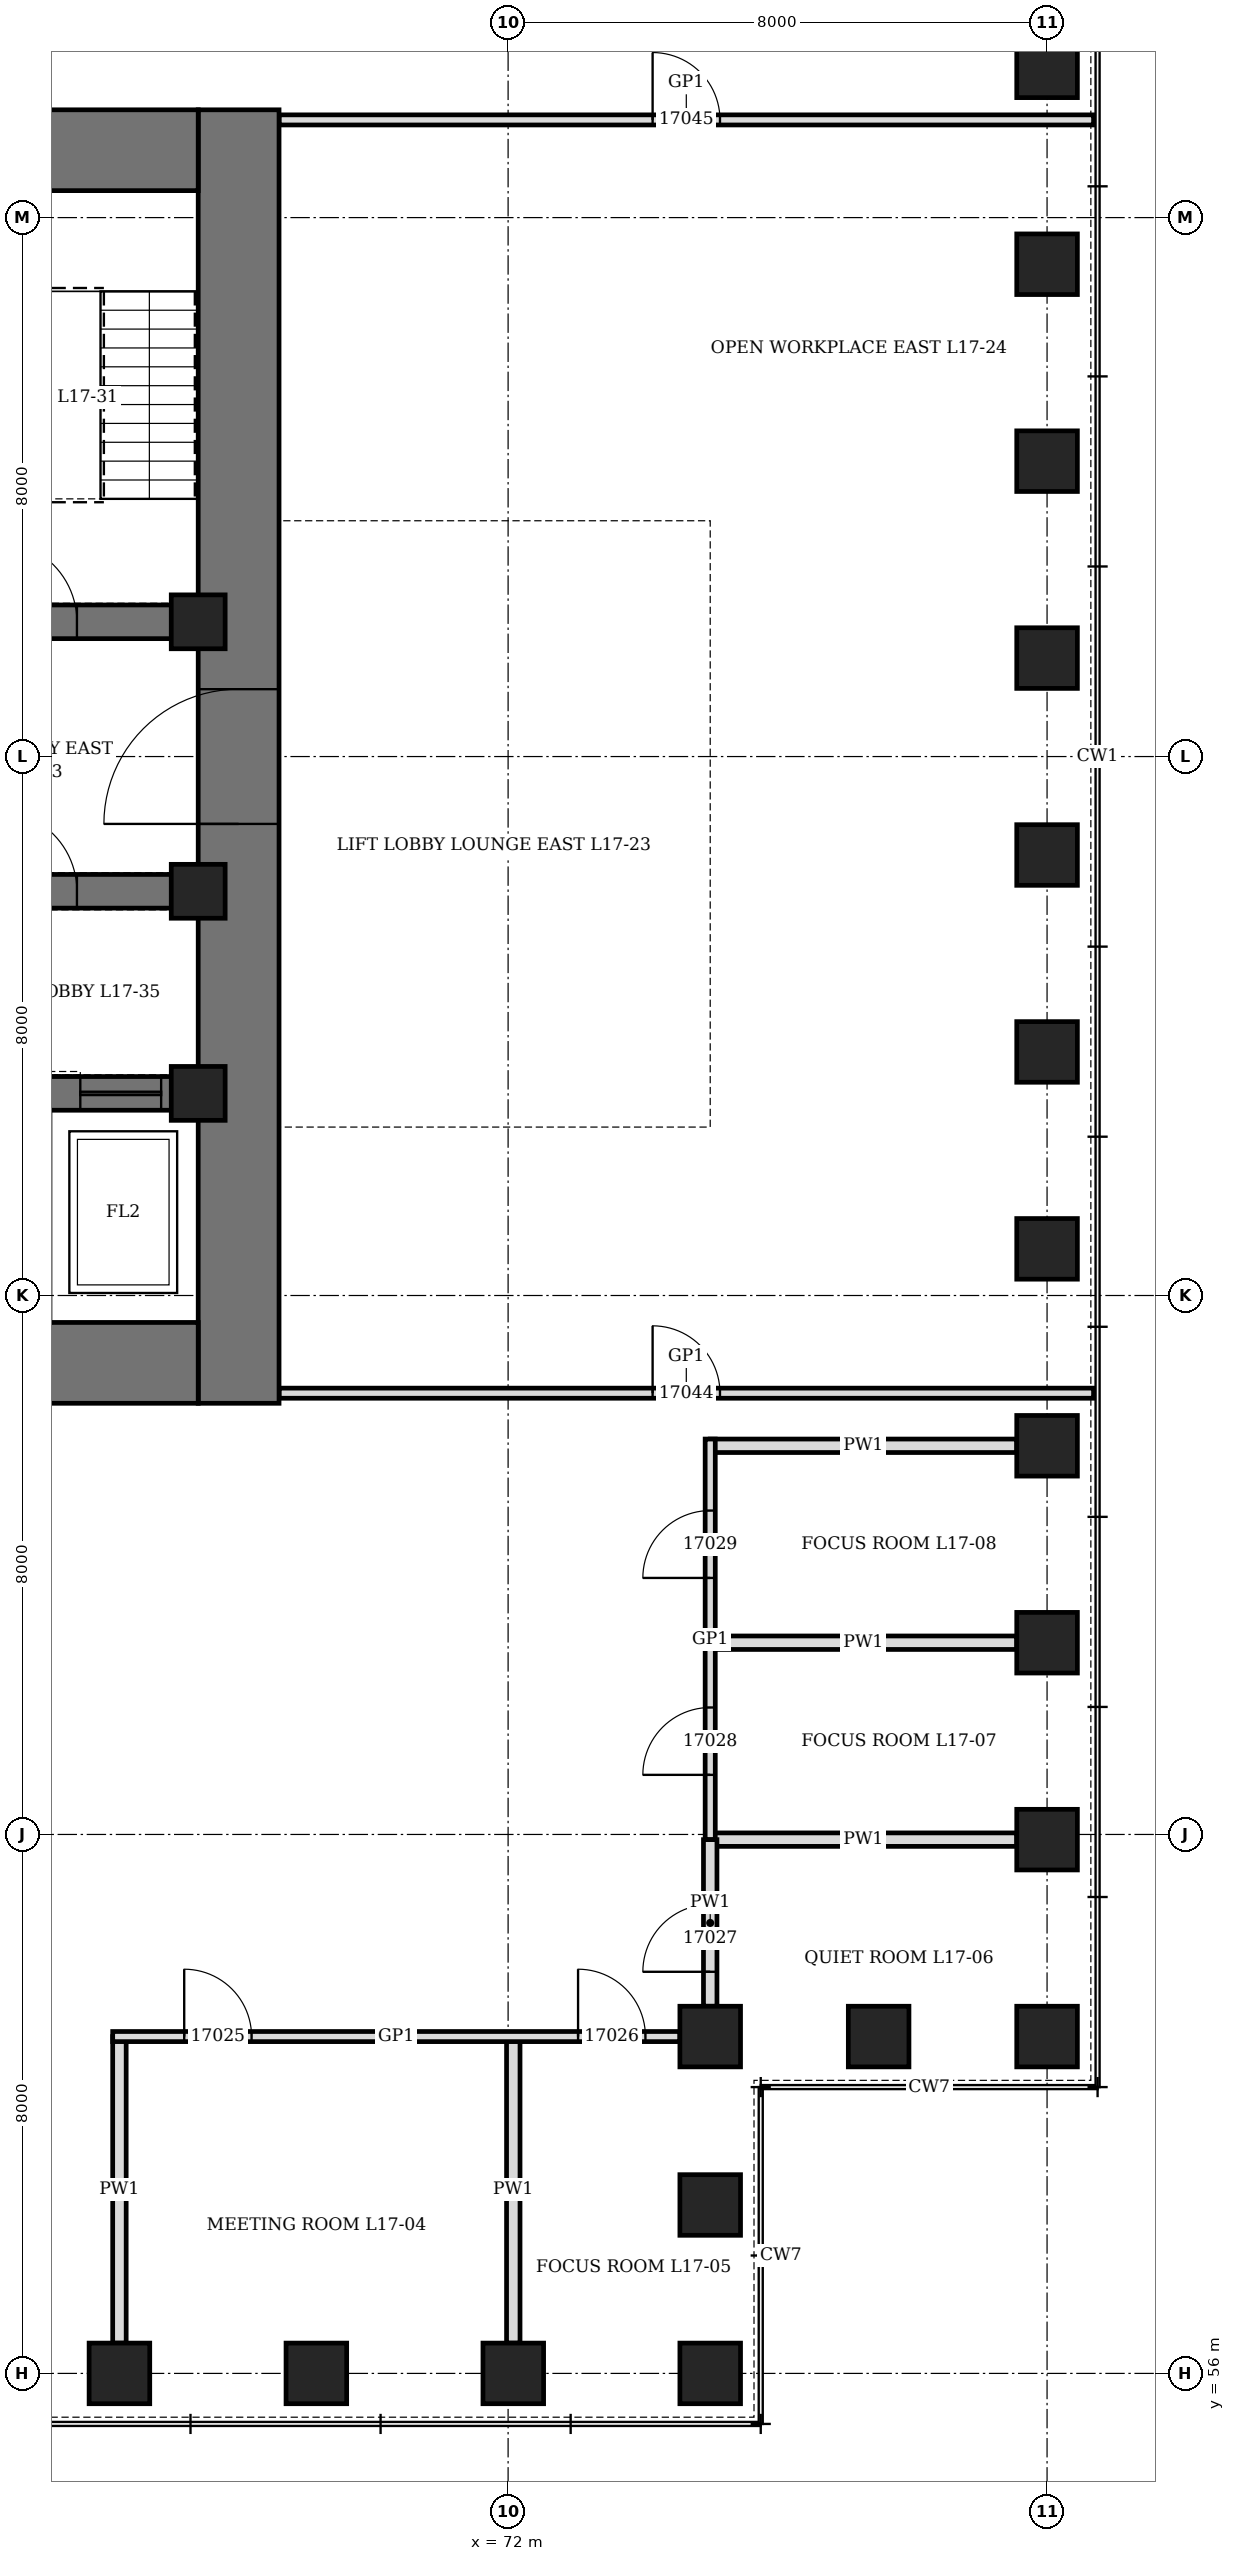
"""IFC4 building model, lengths in metres.
Left out: names, types, materials, properties, quantities, classifications, styles, units other than length and angle.
Written with IfcOpenShell. Run it as: python <this file> out.ifc"""

import sys

from ifc_helpers import new_model, si_unit, direction, frame, frame_2d, origin, origin_2d, place, context, subcontext, project, spatial, rectangle, hollow_rectangle, extrude, element, fill, save


model = new_model("IFC4")
c1 = context("Model", 3, precision=1e-05, world=origin(), true_north=direction((0.0, 1.0)))
c2 = subcontext(c1, "Body", "Model", "MODEL_VIEW")
j1 = project(units=[si_unit("LENGTHUNIT", "METRE"), si_unit("PLANEANGLEUNIT", "RADIAN")], contexts=[c1])
p1 = place(None, origin())
s1 = spatial("IfcSite", under=j1, at=p1, CompositionType="ELEMENT")
p2 = place(p1, origin())
s2 = spatial("IfcBuilding", under=s1, at=p2, CompositionType="ELEMENT")
p3 = place(p2, frame((0.0, 0.0, 81.1)))
s3 = spatial("IfcBuildingStorey", under=s2, at=p3, CompositionType="ELEMENT", Elevation=81.1)
for number, where, z_axis, x_axis in (
    (1, (66.231, 56.0, 0.0), (0.0, 0.0, 1.0), (1.0, 0.0, 0.0)),
    (2, (69.154, 56.0, 0.0), (0.0, 0.0, 1.0), (1.0, 0.0, 0.0)),
    (3, (72.077, 56.0, 0.0), (0.0, 0.0, 1.0), (1.0, 0.0, 0.0)),
    (4, (75.0, 56.0, 0.0), (0.0, 0.0, 1.0), (0.0, 1.0, 0.0)),
    (5, (75.0, 58.5, 0.0), (0.0, 0.0, 1.0), (0.0, 1.0, 0.0)),
    (6, (75.0, 61.0, 0.0), (0.0, 0.0, 1.0), (1.0, 0.0, 0.0)),
    (7, (77.5, 61.0, 0.0), (0.0, 0.0, 1.0), (1.0, 0.0, 0.0)),
    (8, (80.0, 61.0, 0.0), (0.0, 0.0, 1.0), (0.0, 1.0, 0.0)),
    (9, (80.0, 63.923, 0.0), (0.0, 0.0, 1.0), (0.0, 1.0, 0.0)),
    (10, (80.0, 66.846, 0.0), (0.0, 0.0, 1.0), (0.0, 1.0, 0.0)),
    (11, (80.0, 69.769, 0.0), (0.0, 0.0, 1.0), (0.0, 1.0, 0.0)),
    (12, (80.0, 72.692, 0.0), (0.0, 0.0, 1.0), (0.0, 1.0, 0.0)),
    (13, (80.0, 75.615, 0.0), (0.0, 0.0, 1.0), (0.0, 1.0, 0.0)),
    (14, (80.0, 78.539, 0.0), (0.0, 0.0, 1.0), (0.0, 1.0, 0.0)),
    (15, (80.0, 81.461, 0.0), (0.0, 0.0, 1.0), (0.0, 1.0, 0.0)),
    (16, (80.0, 84.385, 0.0), (0.0, 0.0, 1.0), (0.0, 1.0, 0.0)),
    (17, (80.0, 87.308, 0.0), (0.0, 0.0, 1.0), (0.0, 1.0, 0.0)),
    (18, (80.0, 90.231, 0.0), (0.0, 0.0, 1.0), (0.0, 1.0, 0.0)),
):
    element("IfcColumn", number, at=place(p3, frame(where, z_axis=z_axis, x_axis=x_axis)), inside=s3, PredefinedType="COLUMN", context=c2, shape_type="SweptSolid", body=[
        extrude(hollow_rectangle(XDim=0.9, YDim=0.9, WallThickness=0.12, at=origin_2d()), origin(), (0.0, 0.0, 1.0), 4.2),
    ])
p4 = place(p3, frame((68.0, 70.4, 0.0), z_axis=(0.0, 0.0, 1.0), x_axis=(0.0, 1.0, 0.0)))
e19 = element("IfcWall", 19, at=p4, inside=s3, PredefinedType="SHEAR", context=c2, shape_type="SweptSolid", body=[
    extrude(rectangle(XDim=19.2, YDim=1.2, at=frame_2d((9.6, 0.0))), origin(), (0.0, 0.0, 1.0), 4.2),
])
p5 = place(p4, frame((8.6, 0.0, 0.0)))
e20 = element("IfcOpeningElement", 20, at=p5, cuts=e19, PredefinedType="OPENING", context=c2, shape_type="SweptSolid", body=[
    extrude(rectangle(XDim=2.0, YDim=2.4, at=frame_2d((1.0, 1.2))), frame((0.0, 0.61, 0.0), z_axis=(0.0, -1.0, 0.0), x_axis=(1.0, 0.0, 0.0)), (0.0, 0.0, 1.0), 1.22),
])
p6 = place(p3, frame((44.6, 71.0, 0.0), z_axis=(0.0, 0.0, 1.0), x_axis=(1.0, 0.0, 0.0)))
e21 = element("IfcWall", 21, at=p6, inside=s3, PredefinedType="SHEAR", context=c2, shape_type="SweptSolid", body=[
    extrude(rectangle(XDim=22.8, YDim=1.2, at=frame_2d((11.4, 0.0))), origin(), (0.0, 0.0, 1.0), 4.2),
])
p7 = place(p3, frame((44.6, 89.0, 0.0), z_axis=(0.0, 0.0, 1.0), x_axis=(1.0, 0.0, 0.0)))
e22 = element("IfcWall", 22, at=p7, inside=s3, PredefinedType="SHEAR", context=c2, shape_type="SweptSolid", body=[
    extrude(rectangle(XDim=22.8, YDim=1.2, at=frame_2d((11.4, 0.0))), origin(), (0.0, 0.0, 1.0), 4.2),
])
p8 = place(p7, frame((6.55, 0.0, 0.0)))
e23 = element("IfcOpeningElement", 23, at=p8, cuts=e22, PredefinedType="OPENING", context=c2, shape_type="SweptSolid", body=[
    extrude(rectangle(XDim=1.0, YDim=2.1, at=frame_2d((0.5, 1.05))), frame((0.0, 0.61, 0.0), z_axis=(0.0, -1.0, 0.0), x_axis=(1.0, 0.0, 0.0)), (0.0, 0.0, 1.0), 1.22),
])
p9 = place(p7, frame((9.45, 0.0, 0.0)))
e24 = element("IfcOpeningElement", 24, at=p9, cuts=e22, PredefinedType="OPENING", context=c2, shape_type="SweptSolid", body=[
    extrude(rectangle(XDim=0.9, YDim=2.1, at=frame_2d((0.45, 1.05))), frame((0.0, 0.61, 0.0), z_axis=(0.0, -1.0, 0.0), x_axis=(1.0, 0.0, 0.0)), (0.0, 0.0, 1.0), 1.22),
])
p10 = place(p7, frame((12.05, 0.0, 0.0)))
e25 = element("IfcOpeningElement", 25, at=p10, cuts=e22, PredefinedType="OPENING", context=c2, shape_type="SweptSolid", body=[
    extrude(rectangle(XDim=0.9, YDim=2.1, at=frame_2d((0.45, 1.05))), frame((0.0, 0.61, 0.0), z_axis=(0.0, -1.0, 0.0), x_axis=(1.0, 0.0, 0.0)), (0.0, 0.0, 1.0), 1.22),
])
p11 = place(p7, frame((13.975, 0.0, 0.0)))
e26 = element("IfcOpeningElement", 26, at=p11, cuts=e22, PredefinedType="OPENING", context=c2, shape_type="SweptSolid", body=[
    extrude(rectangle(XDim=0.9, YDim=2.1, at=frame_2d((0.45, 1.05))), frame((0.0, 0.61, 0.0), z_axis=(0.0, -1.0, 0.0), x_axis=(1.0, 0.0, 0.0)), (0.0, 0.0, 1.0), 1.22),
])
p12 = place(p3, frame((62.25, 75.0, 0.0), z_axis=(0.0, 0.0, 1.0), x_axis=(1.0, 0.0, 0.0)))
e27 = element("IfcWall", 27, at=p12, inside=s3, PredefinedType="SHEAR", context=c2, shape_type="SweptSolid", body=[
    extrude(rectangle(XDim=5.15, YDim=0.5, at=frame_2d((2.575, 0.0))), origin(), (0.0, 0.0, 1.0), 4.2),
])
p13 = place(p12, frame((0.65, 0.0, 0.0)))
e28 = element("IfcOpeningElement", 28, at=p13, cuts=e27, PredefinedType="OPENING", context=c2, shape_type="SweptSolid", body=[
    extrude(rectangle(XDim=1.2, YDim=2.2, at=frame_2d((0.6, 1.1))), frame((0.0, 0.26, 0.0), z_axis=(0.0, -1.0, 0.0), x_axis=(1.0, 0.0, 0.0)), (0.0, 0.0, 1.0), 0.52),
])
p14 = place(p12, frame((3.4, 0.0, 0.0)))
e29 = element("IfcOpeningElement", 29, at=p14, cuts=e27, PredefinedType="OPENING", context=c2, shape_type="SweptSolid", body=[
    extrude(rectangle(XDim=1.2, YDim=2.2, at=frame_2d((0.6, 1.1))), frame((0.0, 0.26, 0.0), z_axis=(0.0, -1.0, 0.0), x_axis=(1.0, 0.0, 0.0)), (0.0, 0.0, 1.0), 0.52),
])
p15 = place(p3, frame((62.25, 78.0, 0.0), z_axis=(0.0, 0.0, 1.0), x_axis=(1.0, 0.0, 0.0)))
e30 = element("IfcWall", 30, at=p15, inside=s3, PredefinedType="SHEAR", context=c2, shape_type="SweptSolid", body=[
    extrude(rectangle(XDim=5.15, YDim=0.5, at=frame_2d((2.575, 0.0))), origin(), (0.0, 0.0, 1.0), 4.2),
])
p16 = place(p15, frame((2.15, 0.0, 0.0)))
e31 = element("IfcOpeningElement", 31, at=p16, cuts=e30, PredefinedType="OPENING", context=c2, shape_type="SweptSolid", body=[
    extrude(rectangle(XDim=1.2, YDim=2.1, at=frame_2d((0.6, 1.05))), frame((0.0, 0.26, 0.0), z_axis=(0.0, -1.0, 0.0), x_axis=(1.0, 0.0, 0.0)), (0.0, 0.0, 1.0), 0.52),
])
p17 = place(p3, frame((62.25, 82.0, 0.0), z_axis=(0.0, 0.0, 1.0), x_axis=(1.0, 0.0, 0.0)))
e32 = element("IfcWall", 32, at=p17, inside=s3, PredefinedType="SHEAR", context=c2, shape_type="SweptSolid", body=[
    extrude(rectangle(XDim=5.15, YDim=0.5, at=frame_2d((2.575, 0.0))), origin(), (0.0, 0.0, 1.0), 4.2),
])
p18 = place(p17, frame((2.15, 0.0, 0.0)))
e33 = element("IfcOpeningElement", 33, at=p18, cuts=e32, PredefinedType="OPENING", context=c2, shape_type="SweptSolid", body=[
    extrude(rectangle(XDim=1.2, YDim=2.1, at=frame_2d((0.6, 1.05))), frame((0.0, 0.26, 0.0), z_axis=(0.0, -1.0, 0.0), x_axis=(1.0, 0.0, 0.0)), (0.0, 0.0, 1.0), 0.52),
])
for number, where, z_axis, x_axis in (
    (34, (67.4, 75.0, 0.0), (0.0, 0.0, 1.0), (1.0, 0.0, 0.0)),
    (35, (67.4, 78.0, 0.0), (0.0, 0.0, 1.0), (1.0, 0.0, 0.0)),
    (36, (67.4, 82.0, 0.0), (0.0, 0.0, 1.0), (1.0, 0.0, 0.0)),
):
    element("IfcColumn", number, at=place(p3, frame(where, z_axis=z_axis, x_axis=x_axis)), inside=s3, PredefinedType="COLUMN", context=c2, shape_type="SweptSolid", body=[
        extrude(hollow_rectangle(XDim=0.8, YDim=0.8, WallThickness=0.1, at=origin_2d()), origin(), (0.0, 0.0, 1.0), 4.2),
    ])
p19 = place(p3, frame((66.231, 56.45, 0.0), z_axis=(0.0, 0.0, 1.0), x_axis=(0.0, 1.0, 0.0)))
e37 = element("IfcWall", 37, at=p19, inside=s3, PredefinedType="PARTITIONING", context=c2, shape_type="SweptSolid", body=[
    extrude(rectangle(XDim=4.55, YDim=0.2, at=frame_2d((2.275, 0.0))), origin(), (0.0, 0.0, 1.0), 3.278),
])
for number, where, z_axis, x_axis in (
    (38, (72.077, 56.45, 0.0), (0.0, 0.0, 1.0), (0.0, 1.0, 0.0)),
    (39, (75.0, 63.923, 0.0), (0.0, 0.0, 1.0), (1.0, 0.0, 0.0)),
    (40, (75.0, 66.846, 0.0), (0.0, 0.0, 1.0), (1.0, 0.0, 0.0)),
    (41, (75.0, 69.769, 0.0), (0.0, 0.0, 1.0), (1.0, 0.0, 0.0)),
):
    element("IfcWall", number, at=place(p3, frame(where, z_axis=z_axis, x_axis=x_axis)), inside=s3, PredefinedType="PARTITIONING", context=c2, shape_type="SweptSolid", body=[
        extrude(rectangle(XDim=4.55, YDim=0.2, at=frame_2d((2.275, 0.0))), origin(), (0.0, 0.0, 1.0), 3.428),
    ])
p20 = place(p3, frame((66.131, 61.0, 0.0), z_axis=(0.0, 0.0, 1.0), x_axis=(1.0, 0.0, 0.0)))
e42 = element("IfcWall", 42, at=p20, inside=s3, PredefinedType="PARTITIONING", context=c2, shape_type="SweptSolid", body=[
    extrude(rectangle(XDim=8.419, YDim=0.15, at=frame_2d((4.209, 0.0))), origin(), (0.0, 0.0, 1.0), 4.04),
])
p21 = place(p20, frame((1.062, 0.0, 0.0)))
e43 = element("IfcOpeningElement", 43, at=p21, cuts=e42, PredefinedType="OPENING", context=c2, shape_type="SweptSolid", body=[
    extrude(rectangle(XDim=1.0, YDim=2.4, at=frame_2d((0.5, 1.2))), frame((0.0, 0.085, 0.0), z_axis=(0.0, -1.0, 0.0), x_axis=(1.0, 0.0, 0.0)), (0.0, 0.0, 1.0), 0.17),
])
p22 = place(p20, frame((6.908, 0.0, 0.0)))
e44 = element("IfcOpeningElement", 44, at=p22, cuts=e42, PredefinedType="OPENING", context=c2, shape_type="SweptSolid", body=[
    extrude(rectangle(XDim=1.0, YDim=2.4, at=frame_2d((0.5, 1.2))), frame((0.0, 0.085, 0.0), z_axis=(0.0, -1.0, 0.0), x_axis=(1.0, 0.0, 0.0)), (0.0, 0.0, 1.0), 0.17),
])
p23 = place(p3, frame((68.6, 70.55, 0.0), z_axis=(0.0, 0.0, 1.0), x_axis=(1.0, 0.0, 0.0)))
e45 = element("IfcWall", 45, at=p23, inside=s3, PredefinedType="PARTITIONING", context=c2, shape_type="SweptSolid", body=[
    extrude(rectangle(XDim=12.09, YDim=0.15, at=frame_2d((6.045, 0.0))), origin(), (0.0, 0.0, 1.0), 4.04),
])
p24 = place(p23, frame((5.545, 0.0, 0.0)))
e46 = element("IfcOpeningElement", 46, at=p24, cuts=e45, PredefinedType="OPENING", context=c2, shape_type="SweptSolid", body=[
    extrude(rectangle(XDim=1.0, YDim=2.4, at=frame_2d((0.5, 1.2))), frame((0.0, 0.085, 0.0), z_axis=(0.0, -1.0, 0.0), x_axis=(1.0, 0.0, 0.0)), (0.0, 0.0, 1.0), 0.17),
])
p25 = place(p3, frame((68.6, 89.45, 0.0), z_axis=(0.0, 0.0, 1.0), x_axis=(1.0, 0.0, 0.0)))
e47 = element("IfcWall", 47, at=p25, inside=s3, PredefinedType="PARTITIONING", context=c2, shape_type="SweptSolid", body=[
    extrude(rectangle(XDim=12.09, YDim=0.15, at=frame_2d((6.045, 0.0))), origin(), (0.0, 0.0, 1.0), 4.04),
])
p26 = place(p25, frame((5.545, 0.0, 0.0)))
e48 = element("IfcOpeningElement", 48, at=p26, cuts=e47, PredefinedType="OPENING", context=c2, shape_type="SweptSolid", body=[
    extrude(rectangle(XDim=1.0, YDim=2.4, at=frame_2d((0.5, 1.2))), frame((0.0, 0.085, 0.0), z_axis=(0.0, -1.0, 0.0), x_axis=(1.0, 0.0, 0.0)), (0.0, 0.0, 1.0), 0.17),
])
p27 = place(p3, frame((75.0, 63.923, 0.0), z_axis=(0.0, 0.0, 1.0), x_axis=(0.0, 1.0, 0.0)))
e49 = element("IfcWall", 49, at=p27, inside=s3, PredefinedType="PARTITIONING", context=c2, shape_type="SweptSolid", body=[
    extrude(rectangle(XDim=5.946, YDim=0.15, at=frame_2d((2.973, 0.0))), origin(), (0.0, 0.0, 1.0), 4.04),
])
p28 = place(p27, frame((0.961, 0.0, 0.0)))
e50 = element("IfcOpeningElement", 50, at=p28, cuts=e49, PredefinedType="OPENING", context=c2, shape_type="SweptSolid", body=[
    extrude(rectangle(XDim=1.0, YDim=2.4, at=frame_2d((0.5, 1.2))), frame((0.0, 0.085, 0.0), z_axis=(0.0, -1.0, 0.0), x_axis=(1.0, 0.0, 0.0)), (0.0, 0.0, 1.0), 0.17),
])
p29 = place(p27, frame((3.885, 0.0, 0.0)))
e51 = element("IfcOpeningElement", 51, at=p29, cuts=e49, PredefinedType="OPENING", context=c2, shape_type="SweptSolid", body=[
    extrude(rectangle(XDim=1.0, YDim=2.4, at=frame_2d((0.5, 1.2))), frame((0.0, 0.085, 0.0), z_axis=(0.0, -1.0, 0.0), x_axis=(1.0, 0.0, 0.0)), (0.0, 0.0, 1.0), 0.17),
])
p30 = place(p3, frame((75.0, 61.45, 0.0), z_axis=(0.0, 0.0, 1.0), x_axis=(0.0, 1.0, 0.0)))
e52 = element("IfcWall", 52, at=p30, inside=s3, PredefinedType="PARTITIONING", context=c2, shape_type="SweptSolid", body=[
    extrude(rectangle(XDim=2.473, YDim=0.2, at=frame_2d((1.237, 0.0))), origin(), (0.0, 0.0, 1.0), 4.04),
])
p31 = place(p30, frame((0.511, 0.0, 0.0)))
e53 = element("IfcOpeningElement", 53, at=p31, cuts=e52, PredefinedType="OPENING", context=c2, shape_type="SweptSolid", body=[
    extrude(rectangle(XDim=1.0, YDim=2.1, at=frame_2d((0.5, 1.05))), frame((0.0, 0.11, 0.0), z_axis=(0.0, -1.0, 0.0), x_axis=(1.0, 0.0, 0.0)), (0.0, 0.0, 1.0), 0.22),
])
p32 = place(p18, origin())
e54 = element("IfcDoor", 54, at=p32, inside=s3, OperationType="SINGLE_SWING_LEFT", PredefinedType="DOOR", context=c2, shape_type="SweptSolid", body=[
    extrude(rectangle(XDim=1.2, YDim=2.1, at=frame_2d((0.6, 1.05))), frame((0.0, 0.25, 0.0), z_axis=(0.0, -1.0, 0.0), x_axis=(1.0, 0.0, 0.0)), (0.0, 0.0, 1.0), 0.5),
])
fill(e33, e54)
p33 = place(p5, origin())
e55 = element("IfcDoor", 55, at=p33, inside=s3, OperationType="DOUBLE_DOOR_SINGLE_SWING", PredefinedType="DOOR", context=c2, shape_type="SweptSolid", body=[
    extrude(rectangle(XDim=2.0, YDim=2.4, at=frame_2d((1.0, 1.2))), frame((0.0, 0.35, 0.0), z_axis=(0.0, -1.0, 0.0), x_axis=(1.0, 0.0, 0.0)), (0.0, 0.0, 1.0), 0.7),
])
fill(e20, e55)
p34 = place(p16, origin())
e56 = element("IfcDoor", 56, at=p34, inside=s3, OperationType="SINGLE_SWING_RIGHT", PredefinedType="DOOR", context=c2, shape_type="SweptSolid", body=[
    extrude(rectangle(XDim=1.2, YDim=2.1, at=frame_2d((0.6, 1.05))), frame((0.0, 0.25, 0.0), z_axis=(0.0, -1.0, 0.0), x_axis=(1.0, 0.0, 0.0)), (0.0, 0.0, 1.0), 0.5),
])
fill(e31, e56)
p35 = place(p14, origin())
e57 = element("IfcDoor", 57, at=p35, inside=s3, OperationType="SLIDING_TO_LEFT", PredefinedType="DOOR", context=c2, shape_type="SweptSolid", body=[
    extrude(rectangle(XDim=1.2, YDim=2.2, at=frame_2d((0.6, 1.1))), frame((0.0, 0.25, 0.0), z_axis=(0.0, -1.0, 0.0), x_axis=(1.0, 0.0, 0.0)), (0.0, 0.0, 1.0), 0.5),
])
fill(e29, e57)
p36 = place(p21, origin())
e58 = element("IfcDoor", 58, at=p36, inside=s3, OperationType="SINGLE_SWING_RIGHT", PredefinedType="DOOR", context=c2, shape_type="SweptSolid", body=[
    extrude(rectangle(XDim=1.0, YDim=2.4, at=frame_2d((0.5, 1.2))), frame((0.0, 0.075, 0.0), z_axis=(0.0, -1.0, 0.0), x_axis=(1.0, 0.0, 0.0)), (0.0, 0.0, 1.0), 0.149),
])
fill(e43, e58)
p37 = place(p22, origin())
e59 = element("IfcDoor", 59, at=p37, inside=s3, OperationType="SINGLE_SWING_RIGHT", PredefinedType="DOOR", context=c2, shape_type="SweptSolid", body=[
    extrude(rectangle(XDim=1.0, YDim=2.4, at=frame_2d((0.5, 1.2))), frame((0.0, 0.075, 0.0), z_axis=(0.0, -1.0, 0.0), x_axis=(1.0, 0.0, 0.0)), (0.0, 0.0, 1.0), 0.149),
])
fill(e44, e59)
p38 = place(p31, origin())
e60 = element("IfcDoor", 60, at=p38, inside=s3, OperationType="SINGLE_SWING_LEFT", PredefinedType="DOOR", context=c2, shape_type="SweptSolid", body=[
    extrude(rectangle(XDim=1.0, YDim=2.1, at=frame_2d((0.5, 1.05))), frame((0.0, 0.1, 0.0), z_axis=(0.0, -1.0, 0.0), x_axis=(1.0, 0.0, 0.0)), (0.0, 0.0, 1.0), 0.199),
])
fill(e53, e60)
p39 = place(p28, origin())
e61 = element("IfcDoor", 61, at=p39, inside=s3, OperationType="SINGLE_SWING_RIGHT", PredefinedType="DOOR", context=c2, shape_type="SweptSolid", body=[
    extrude(rectangle(XDim=1.0, YDim=2.4, at=frame_2d((0.5, 1.2))), frame((0.0, 0.075, 0.0), z_axis=(0.0, -1.0, 0.0), x_axis=(1.0, 0.0, 0.0)), (0.0, 0.0, 1.0), 0.149),
])
fill(e50, e61)
p40 = place(p29, origin())
e62 = element("IfcDoor", 62, at=p40, inside=s3, OperationType="SINGLE_SWING_RIGHT", PredefinedType="DOOR", context=c2, shape_type="SweptSolid", body=[
    extrude(rectangle(XDim=1.0, YDim=2.4, at=frame_2d((0.5, 1.2))), frame((0.0, 0.075, 0.0), z_axis=(0.0, -1.0, 0.0), x_axis=(1.0, 0.0, 0.0)), (0.0, 0.0, 1.0), 0.149),
])
fill(e51, e62)
p41 = place(p24, origin())
e63 = element("IfcDoor", 63, at=p41, inside=s3, OperationType="SINGLE_SWING_RIGHT", PredefinedType="DOOR", context=c2, shape_type="SweptSolid", body=[
    extrude(rectangle(XDim=1.0, YDim=2.4, at=frame_2d((0.5, 1.2))), frame((0.0, 0.075, 0.0), z_axis=(0.0, -1.0, 0.0), x_axis=(1.0, 0.0, 0.0)), (0.0, 0.0, 1.0), 0.149),
])
fill(e46, e63)
p42 = place(p26, origin())
e64 = element("IfcDoor", 64, at=p42, inside=s3, OperationType="SINGLE_SWING_RIGHT", PredefinedType="DOOR", context=c2, shape_type="SweptSolid", body=[
    extrude(rectangle(XDim=1.0, YDim=2.4, at=frame_2d((0.5, 1.2))), frame((0.0, 0.075, 0.0), z_axis=(0.0, -1.0, 0.0), x_axis=(1.0, 0.0, 0.0)), (0.0, 0.0, 1.0), 0.149),
])
fill(e48, e64)
save(model, sys.argv[1])
